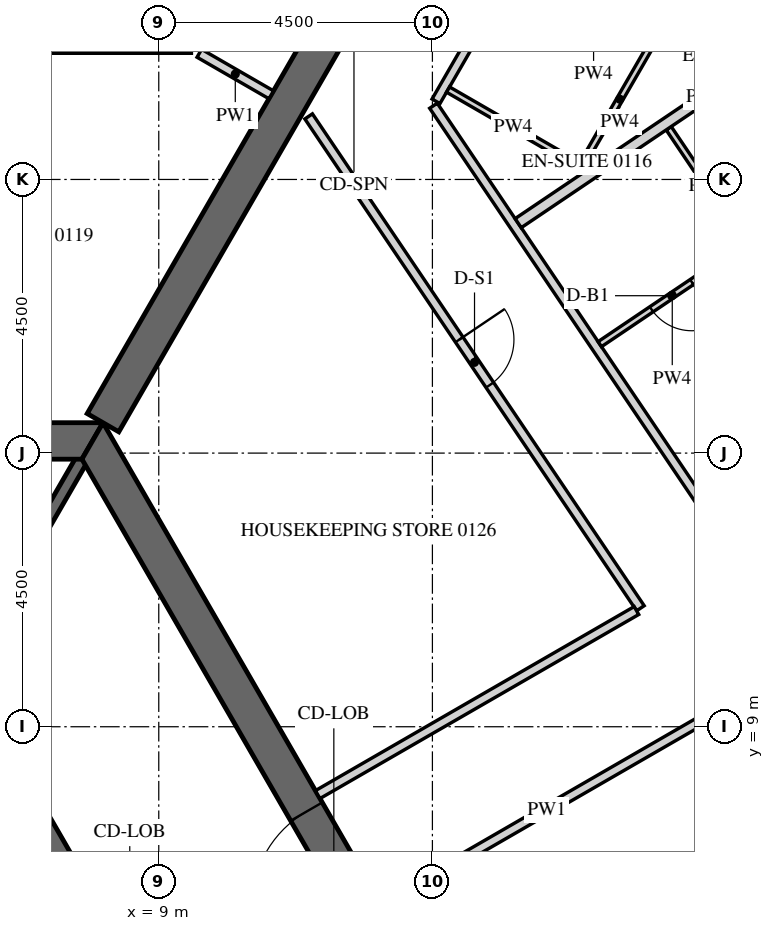
"""IFC4 building model, lengths in metres.
Left out: names, types, materials, properties, quantities, classifications, styles, units other than length and angle.
Written with IfcOpenShell. Run it as: python <this file> out.ifc"""

import sys

from ifc_helpers import new_model, si_unit, direction, frame, frame_2d, origin, place, context, subcontext, project, spatial, polyline, rectangle, outline, extrude, element, fill, save


model = new_model("IFC4")
c1 = context("Model", 3, precision=1e-05, world=origin(), true_north=direction((0.0, 1.0)))
c2 = subcontext(c1, "Body", "Model", "MODEL_VIEW")
j1 = project(units=[si_unit("LENGTHUNIT", "METRE"), si_unit("PLANEANGLEUNIT", "RADIAN")], contexts=[c1])
p1 = place(None, origin())
s1 = spatial("IfcSite", under=j1, at=p1, CompositionType="ELEMENT")
p2 = place(p1, origin())
s2 = spatial("IfcBuilding", under=s1, at=p2, CompositionType="ELEMENT")
p3 = place(p2, frame((0.0, 0.0, 37.5)))
s3 = spatial("IfcBuildingStorey", under=s2, at=p3, CompositionType="ELEMENT", Elevation=37.5)
p4 = place(p3, frame((33.728, 3.153, -0.15), z_axis=(0.0, 0.0, 1.0), x_axis=(-0.559192411416, 0.82903790445, 0.0)))
e1 = element("IfcWall", 1, at=p4, inside=s3, PredefinedType="SOLIDWALL", context=c2, shape_type="SweptSolid", body=[
    extrude(outline(polyline([(-0.026, -0.275), (30.093, -0.275), (30.048, 0.275), (0.026, 0.275), (-0.026, -0.275)])), origin(), (0.0, 0.0, 1.0), 3.9),
])
p5 = place(p4, frame((1.236, 0.0, 1.05)))
e2 = element("IfcOpeningElement", 2, at=p5, cuts=e1, PredefinedType="OPENING", context=c2, shape_type="SweptSolid", body=[
    extrude(rectangle(XDim=2.4, YDim=2.4, at=frame_2d((1.2, 1.2))), frame((0.0, 0.285, 0.0), z_axis=(0.0, -1.0, 0.0), x_axis=(1.0, 0.0, 0.0)), (0.0, 0.0, 1.0), 0.57),
])
p6 = place(p4, frame((4.835, 0.0, 1.05)))
e3 = element("IfcOpeningElement", 3, at=p6, cuts=e1, PredefinedType="OPENING", context=c2, shape_type="SweptSolid", body=[
    extrude(rectangle(XDim=2.4, YDim=2.4, at=frame_2d((1.2, 1.2))), frame((0.0, 0.285, 0.0), z_axis=(0.0, -1.0, 0.0), x_axis=(1.0, 0.0, 0.0)), (0.0, 0.0, 1.0), 0.57),
])
p7 = place(p4, frame((8.436, 0.0, 1.05)))
e4 = element("IfcOpeningElement", 4, at=p7, cuts=e1, PredefinedType="OPENING", context=c2, shape_type="SweptSolid", body=[
    extrude(rectangle(XDim=2.4, YDim=2.4, at=frame_2d((1.2, 1.2))), frame((0.0, 0.285, 0.0), z_axis=(0.0, -1.0, 0.0), x_axis=(1.0, 0.0, 0.0)), (0.0, 0.0, 1.0), 0.57),
])
p8 = place(p4, frame((12.035, 0.0, 1.05)))
e5 = element("IfcOpeningElement", 5, at=p8, cuts=e1, PredefinedType="OPENING", context=c2, shape_type="SweptSolid", body=[
    extrude(rectangle(XDim=2.4, YDim=2.4, at=frame_2d((1.2, 1.2))), frame((0.0, 0.285, 0.0), z_axis=(0.0, -1.0, 0.0), x_axis=(1.0, 0.0, 0.0)), (0.0, 0.0, 1.0), 0.57),
])
p9 = place(p4, frame((15.635, 0.0, 1.05)))
e6 = element("IfcOpeningElement", 6, at=p9, cuts=e1, PredefinedType="OPENING", context=c2, shape_type="SweptSolid", body=[
    extrude(rectangle(XDim=2.4, YDim=2.4, at=frame_2d((1.2, 1.2))), frame((0.0, 0.285, 0.0), z_axis=(0.0, -1.0, 0.0), x_axis=(1.0, 0.0, 0.0)), (0.0, 0.0, 1.0), 0.57),
])
p10 = place(p4, frame((19.236, 0.0, 1.05)))
e7 = element("IfcOpeningElement", 7, at=p10, cuts=e1, PredefinedType="OPENING", context=c2, shape_type="SweptSolid", body=[
    extrude(rectangle(XDim=2.4, YDim=2.4, at=frame_2d((1.2, 1.2))), frame((0.0, 0.285, 0.0), z_axis=(0.0, -1.0, 0.0), x_axis=(1.0, 0.0, 0.0)), (0.0, 0.0, 1.0), 0.57),
])
p11 = place(p4, frame((22.835, 0.0, 1.05)))
e8 = element("IfcOpeningElement", 8, at=p11, cuts=e1, PredefinedType="OPENING", context=c2, shape_type="SweptSolid", body=[
    extrude(rectangle(XDim=2.4, YDim=2.4, at=frame_2d((1.2, 1.2))), frame((0.0, 0.285, 0.0), z_axis=(0.0, -1.0, 0.0), x_axis=(1.0, 0.0, 0.0)), (0.0, 0.0, 1.0), 0.57),
])
p12 = place(p4, frame((26.436, 0.0, 1.05)))
e9 = element("IfcOpeningElement", 9, at=p12, cuts=e1, PredefinedType="OPENING", context=c2, shape_type="SweptSolid", body=[
    extrude(rectangle(XDim=2.4, YDim=2.4, at=frame_2d((1.2, 1.2))), frame((0.0, 0.285, 0.0), z_axis=(0.0, -1.0, 0.0), x_axis=(1.0, 0.0, 0.0)), (0.0, 0.0, 1.0), 0.57),
])
p13 = place(p3, frame((15.819, 0.0, -0.15), z_axis=(0.0, 0.0, 1.0), x_axis=(-0.499999880136, 0.866025472988, 0.0)))
e10 = element("IfcWall", 10, at=p13, inside=s3, PredefinedType="SHEAR", context=c2, shape_type="SweptSolid", body=[
    extrude(outline(polyline([(-0.173, -0.3), (15.993, -0.3), (15.646, 0.3), (0.173, 0.3), (-0.173, -0.3)])), origin(), (0.0, 0.0, 1.0), 3.9),
])
p14 = place(p13, frame((6.981, 0.0, 0.15)))
e11 = element("IfcOpeningElement", 11, at=p14, cuts=e10, PredefinedType="OPENING", context=c2, shape_type="SweptSolid", body=[
    extrude(rectangle(XDim=1.8, YDim=2.4, at=frame_2d((0.9, 1.2))), frame((0.0, 0.31, 0.0), z_axis=(0.0, -1.0, 0.0), x_axis=(1.0, 0.0, 0.0)), (0.0, 0.0, 1.0), 0.62),
])
p15 = place(p3, frame((7.91, 13.7, -0.15), z_axis=(0.0, 0.0, 1.0), x_axis=(-1.0, 0.0, 0.0)))
e12 = element("IfcWall", 12, at=p15, inside=s3, PredefinedType="SHEAR", context=c2, shape_type="SweptSolid", body=[
    extrude(outline(polyline([(-0.173, -0.3), (15.993, -0.3), (15.646, 0.3), (0.173, 0.3), (-0.173, -0.3)])), origin(), (0.0, 0.0, 1.0), 3.9),
])
p16 = place(p15, frame((7.31, 0.0, 0.15)))
e13 = element("IfcOpeningElement", 13, at=p16, cuts=e12, PredefinedType="OPENING", context=c2, shape_type="SweptSolid", body=[
    extrude(rectangle(XDim=1.2, YDim=2.4, at=frame_2d((0.6, 1.2))), frame((0.0, 0.31, 0.0), z_axis=(0.0, -1.0, 0.0), x_axis=(1.0, 0.0, 0.0)), (0.0, 0.0, 1.0), 0.62),
])
p17 = place(p3, frame((8.083, 14.0, -0.15), z_axis=(0.0, 0.0, 1.0), x_axis=(0.499997680643, 0.866026742862, 0.0)))
e14 = element("IfcWall", 14, at=p17, inside=s3, PredefinedType="SHEAR", context=c2, shape_type="SweptSolid", body=[
    extrude(rectangle(XDim=16.509, YDim=0.6, at=frame_2d((8.254, 0.0))), origin(), (0.0, 0.0, 1.0), 3.9),
])
p18 = place(p17, frame((7.354, 0.0, 0.15)))
e15 = element("IfcOpeningElement", 15, at=p18, cuts=e14, PredefinedType="OPENING", context=c2, shape_type="SweptSolid", body=[
    extrude(rectangle(XDim=1.8, YDim=2.4, at=frame_2d((0.9, 1.2))), frame((0.0, 0.31, 0.0), z_axis=(0.0, -1.0, 0.0), x_axis=(1.0, 0.0, 0.0)), (0.0, 0.0, 1.0), 0.62),
])
p19 = place(p3, frame((11.345, 0.0, -0.15), z_axis=(0.0, 0.0, 1.0), x_axis=(-0.499995046907, 0.866028263435, 0.0)))
e16 = element("IfcWall", 16, at=p19, inside=s3, PredefinedType="SHEAR", context=c2, shape_type="SweptSolid", body=[
    extrude(outline(polyline([(-0.101, -0.175), (11.446, -0.175), (11.244, 0.175), (0.101, 0.175), (-0.101, -0.175)])), origin(), (0.0, 0.0, 1.0), 3.9),
])
p20 = place(p19, frame((4.744, 0.0, 0.15)))
e17 = element("IfcOpeningElement", 17, at=p20, cuts=e16, PredefinedType="OPENING", context=c2, shape_type="SweptSolid", body=[
    extrude(rectangle(XDim=1.8, YDim=2.4, at=frame_2d((0.9, 1.2))), frame((0.0, 0.185, 0.0), z_axis=(0.0, -1.0, 0.0), x_axis=(1.0, 0.0, 0.0)), (0.0, 0.0, 1.0), 0.37),
])
p21 = place(p3, frame((5.773, 10.0, -0.15), z_axis=(0.0, 0.0, 1.0), x_axis=(0.500038251005, 0.86600331843, 0.0)))
e18 = element("IfcWall", 18, at=p21, inside=s3, PredefinedType="SHEAR", context=c2, shape_type="SweptSolid", body=[
    extrude(rectangle(XDim=3.926, YDim=0.2, at=frame_2d((1.963, 0.0))), origin(), (0.0, 0.0, 1.0), 3.9),
])
p22 = place(p3, frame((0.825, 20.15, 0.0), z_axis=(0.0, 0.0, 1.0), x_axis=(1.0, 0.0, 0.0)))
e19 = element("IfcWall", 19, at=p22, inside=s3, PredefinedType="PARTITIONING", context=c2, shape_type="SweptSolid", body=[
    extrude(rectangle(XDim=8.712, YDim=0.15, at=frame_2d((4.356, 0.0))), origin(), (0.0, 0.0, 1.0), 2.988),
])
p23 = place(p22, frame((3.906, 0.0, 0.0)))
e20 = element("IfcOpeningElement", 20, at=p23, cuts=e19, PredefinedType="OPENING", context=c2, shape_type="SweptSolid", body=[
    extrude(rectangle(XDim=0.9, YDim=2.1, at=frame_2d((0.45, 1.05))), frame((0.0, 0.085, 0.0), z_axis=(0.0, -1.0, 0.0), x_axis=(1.0, 0.0, 0.0)), (0.0, 0.0, 1.0), 0.17),
])
p24 = place(p3, frame((9.667, 20.075, 0.0), z_axis=(0.0, 0.0, 1.0), x_axis=(0.866000994684, -0.500042275419, 0.0)))
e21 = element("IfcWall", 21, at=p24, inside=s3, PredefinedType="PARTITIONING", context=c2, shape_type="SweptSolid", body=[
    extrude(rectangle(XDim=1.366, YDim=0.15, at=frame_2d((0.683, 0.0))), origin(), (0.0, 0.0, 1.0), 2.988),
])
p25 = place(p3, frame((25.821, 0.972, 0.0), z_axis=(0.0, 0.0, 1.0), x_axis=(-0.559193816298, 0.829036956845, 0.0)))
e22 = element("IfcWall", 22, at=p25, inside=s3, PredefinedType="PARTITIONING", context=c2, shape_type="SweptSolid", body=[
    extrude(rectangle(XDim=22.002, YDim=0.15, at=frame_2d((11.001, 0.0))), origin(), (0.0, 0.0, 1.0), 2.988),
])
p26 = place(p25, frame((0.869, 0.0, 0.0)))
e23 = element("IfcOpeningElement", 23, at=p26, cuts=e22, PredefinedType="OPENING", context=c2, shape_type="SweptSolid", body=[
    extrude(rectangle(XDim=1.0, YDim=2.1, at=frame_2d((0.5, 1.05))), frame((0.0, 0.085, 0.0), z_axis=(0.0, -1.0, 0.0), x_axis=(1.0, 0.0, 0.0)), (0.0, 0.0, 1.0), 0.17),
])
p27 = place(p25, frame((10.721, 0.0, 0.0)))
e24 = element("IfcOpeningElement", 24, at=p27, cuts=e22, PredefinedType="OPENING", context=c2, shape_type="SweptSolid", body=[
    extrude(rectangle(XDim=1.0, YDim=2.1, at=frame_2d((0.5, 1.05))), frame((0.0, 0.085, 0.0), z_axis=(0.0, -1.0, 0.0), x_axis=(1.0, 0.0, 0.0)), (0.0, 0.0, 1.0), 0.17),
])
p28 = place(p3, frame((13.559, 19.285, 0.0), z_axis=(0.0, 0.0, 1.0), x_axis=(0.499975646431, 0.866039463868, 0.0)))
e25 = element("IfcWall", 25, at=p28, inside=s3, PredefinedType="PARTITIONING", context=c2, shape_type="SweptSolid", body=[
    extrude(rectangle(XDim=3.84, YDim=0.15, at=frame_2d((1.92, 0.0))), origin(), (0.0, 0.0, 1.0), 2.988),
])
p29 = place(p3, frame((12.664, 6.066, 0.0), z_axis=(0.0, 0.0, 1.0), x_axis=(0.866036561919, 0.499980673046, 0.0)))
e26 = element("IfcWall", 26, at=p29, inside=s3, PredefinedType="PARTITIONING", context=c2, shape_type="SweptSolid", body=[
    extrude(rectangle(XDim=6.275, YDim=0.15, at=frame_2d((3.137, 0.0))), origin(), (0.0, 0.0, 1.0), 2.988),
])
p30 = place(p3, frame((11.465, 19.037, 0.0), z_axis=(0.0, 0.0, 1.0), x_axis=(0.559196064773, -0.829035440221, 0.0)))
e27 = element("IfcWall", 27, at=p30, inside=s3, PredefinedType="PARTITIONING", context=c2, shape_type="SweptSolid", body=[
    extrude(rectangle(XDim=9.757, YDim=0.15, at=frame_2d((4.878, 0.0))), origin(), (0.0, 0.0, 1.0), 2.988),
])
p31 = place(p30, frame((4.428, 0.0, 0.0)))
e28 = element("IfcOpeningElement", 28, at=p31, cuts=e27, PredefinedType="OPENING", context=c2, shape_type="SweptSolid", body=[
    extrude(rectangle(XDim=0.9, YDim=2.1, at=frame_2d((0.45, 1.05))), frame((0.0, 0.085, 0.0), z_axis=(0.0, -1.0, 0.0), x_axis=(1.0, 0.0, 0.0)), (0.0, 0.0, 1.0), 0.17),
])
p32 = place(p3, frame((16.855, 10.911, 0.0), z_axis=(0.0, 0.0, 1.0), x_axis=(-0.866020343444, -0.500008764664, 0.0)))
e29 = element("IfcWall", 29, at=p32, inside=s3, PredefinedType="PARTITIONING", context=c2, shape_type="SweptSolid", body=[
    extrude(rectangle(XDim=6.053, YDim=0.15, at=frame_2d((3.026, 0.0))), origin(), (0.0, 0.0, 1.0), 2.988),
])
p33 = place(p3, frame((17.386, 18.842, 0.0), z_axis=(0.0, 0.0, 1.0), x_axis=(0.559131530856, -0.829078965602, 0.0)))
e30 = element("IfcWall", 30, at=p33, inside=s3, PredefinedType="PARTITIONING", context=c2, shape_type="SweptSolid", body=[
    extrude(rectangle(XDim=2.31, YDim=0.1, at=frame_2d((1.155, 0.0))), origin(), (0.0, 0.0, 1.0), 2.988),
])
p34 = place(p3, frame((18.636, 16.899, 0.0), z_axis=(0.0, 0.0, 1.0), x_axis=(-0.82904649496, -0.559179675234, 0.0)))
e31 = element("IfcWall", 31, at=p34, inside=s3, PredefinedType="PARTITIONING", context=c2, shape_type="SweptSolid", body=[
    extrude(rectangle(XDim=2.875, YDim=0.1, at=frame_2d((1.438, 0.0))), origin(), (0.0, 0.0, 1.0), 2.988),
])
p35 = place(p34, frame((1.05, 0.0, 0.0)))
e32 = element("IfcOpeningElement", 32, at=p35, cuts=e31, PredefinedType="OPENING", context=c2, shape_type="SweptSolid", body=[
    extrude(rectangle(XDim=0.8, YDim=2.1, at=frame_2d((0.4, 1.05))), frame((0.0, 0.06, 0.0), z_axis=(0.0, -1.0, 0.0), x_axis=(1.0, 0.0, 0.0)), (0.0, 0.0, 1.0), 0.12),
])
p36 = place(p3, frame((21.066, 21.433, 0.0), z_axis=(0.0, 0.0, 1.0), x_axis=(-0.829028170871, -0.559206841788, 0.0)))
e33 = element("IfcWall", 33, at=p36, inside=s3, PredefinedType="PARTITIONING", context=c2, shape_type="SweptSolid", body=[
    extrude(rectangle(XDim=7.425, YDim=0.18, at=frame_2d((3.712, 0.0))), origin(), (0.0, 0.0, 1.0), 2.988),
])
p37 = place(p3, frame((17.219, 20.424, 0.0), z_axis=(0.0, 0.0, 1.0), x_axis=(-0.499948979701, -0.866054858364, 0.0)))
e34 = element("IfcWall", 34, at=p37, inside=s3, PredefinedType="PARTITIONING", context=c2, shape_type="SweptSolid", body=[
    extrude(rectangle(XDim=2.55, YDim=0.1, at=frame_2d((1.275, 0.0))), origin(), (0.0, 0.0, 1.0), 2.988),
])
p38 = place(p3, frame((15.901, 18.241, 0.0), z_axis=(0.0, 0.0, 1.0), x_axis=(-0.866006523861, 0.500032699561, 0.0)))
e35 = element("IfcWall", 35, at=p38, inside=s3, PredefinedType="PARTITIONING", context=c2, shape_type="SweptSolid", body=[
    extrude(rectangle(XDim=2.475, YDim=0.1, at=frame_2d((1.237, 0.0))), origin(), (0.0, 0.0, 1.0), 2.988),
])
p39 = place(p14, origin())
e36 = element("IfcDoor", 36, at=p39, inside=s3, OperationType="DOUBLE_DOOR_SINGLE_SWING", PredefinedType="DOOR", context=c2, shape_type="SweptSolid", body=[
    extrude(rectangle(XDim=1.8, YDim=2.4, at=frame_2d((0.9, 1.2))), frame((0.0, 0.025, 0.0), z_axis=(0.0, -1.0, 0.0), x_axis=(1.0, 0.0, 0.0)), (0.0, 0.0, 1.0), 0.05),
])
fill(e11, e36)
p40 = place(p35, origin())
e37 = element("IfcDoor", 37, at=p40, inside=s3, OperationType="SINGLE_SWING_LEFT", PredefinedType="DOOR", context=c2, shape_type="SweptSolid", body=[
    extrude(rectangle(XDim=0.8, YDim=2.1, at=frame_2d((0.4, 1.05))), frame((0.0, 0.025, 0.0), z_axis=(0.0, -1.0, 0.0), x_axis=(1.0, 0.0, 0.0)), (0.0, 0.0, 1.0), 0.05),
])
fill(e32, e37)
p41 = place(p31, origin())
e38 = element("IfcDoor", 38, at=p41, inside=s3, OperationType="SINGLE_SWING_RIGHT", PredefinedType="DOOR", context=c2, shape_type="SweptSolid", body=[
    extrude(rectangle(XDim=0.9, YDim=2.1, at=frame_2d((0.45, 1.05))), frame((0.0, 0.025, 0.0), z_axis=(0.0, -1.0, 0.0), x_axis=(1.0, 0.0, 0.0)), (0.0, 0.0, 1.0), 0.05),
])
fill(e28, e38)
save(model, sys.argv[1])
